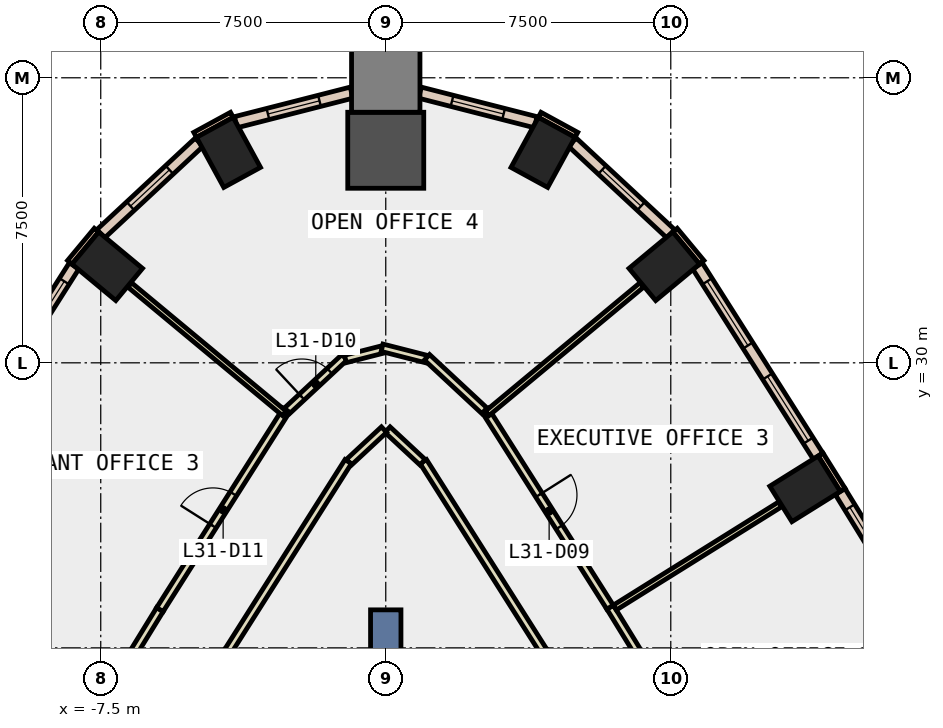
"""IFC4 building model, lengths in metres.
Left out: names, types, materials, properties, quantities, classifications, styles, units other than length and angle.
Written with IfcOpenShell. Run it as: python <this file> out.ifc"""

import sys

from ifc_helpers import new_model, si_unit, direction, frame, frame_2d, origin, origin_2d, place, context, subcontext, project, spatial, rectangle, extrude, element, fill, save


model = new_model("IFC4")
c1 = context("Model", 3, precision=1e-05, world=origin(), true_north=direction((0.0, 1.0)))
c2 = subcontext(c1, "Body", "Model", "MODEL_VIEW")
j1 = project(units=[si_unit("LENGTHUNIT", "METRE"), si_unit("PLANEANGLEUNIT", "RADIAN")], contexts=[c1])
p1 = place(None, origin())
s1 = spatial("IfcSite", under=j1, at=p1, CompositionType="ELEMENT")
p2 = place(p1, origin())
s2 = spatial("IfcBuilding", under=s1, at=p2, CompositionType="ELEMENT")
p3 = place(p2, frame((0.0, 0.0, 142.4)))
s3 = spatial("IfcBuildingStorey", under=s2, at=p3, CompositionType="ELEMENT", Elevation=142.4)
for number, where, z_axis, x_axis in (
    (1, (11.033, 26.684, -0.4), (0.0, 0.0, 1.0), (-0.53, 0.848, 0.0)),
    (2, (7.329, 32.541, -0.4), (0.0, 0.0, 1.0), (-0.639, 0.769, 0.0)),
    (3, (4.138, 35.537, -0.4), (0.0, 0.0, 1.0), (-0.878, 0.479, 0.0)),
):
    element("IfcColumn", number, at=place(p3, frame(where, z_axis=z_axis, x_axis=x_axis)), inside=s3, PredefinedType="COLUMN", context=c2, shape_type="SweptSolid", body=[
        extrude(rectangle(XDim=1.1, YDim=1.5, at=origin_2d()), origin(), (0.0, 0.0, 1.0), 4.2),
    ])
p4 = place(p3, frame((0.0, 35.593, -0.4), z_axis=(0.0, 0.0, 1.0), x_axis=(0.0, 1.0, 0.0)))
e4 = element("IfcColumn", 4, at=p4, inside=s3, PredefinedType="COLUMN", context=c2, shape_type="SweptSolid", body=[
    extrude(rectangle(XDim=2.0, YDim=2.0, at=origin_2d()), origin(), (0.0, 0.0, 1.0), 4.2),
])
for number, where, z_axis, x_axis in (
    (5, (-4.138, 35.537, -0.4), (0.0, 0.0, 1.0), (0.878, 0.479, 0.0)),
    (6, (-7.329, 32.541, -0.4), (0.0, 0.0, 1.0), (0.639, 0.769, 0.0)),
):
    element("IfcColumn", number, at=place(p3, frame(where, z_axis=z_axis, x_axis=x_axis)), inside=s3, PredefinedType="COLUMN", context=c2, shape_type="SweptSolid", body=[
        extrude(rectangle(XDim=1.1, YDim=1.5, at=origin_2d()), origin(), (0.0, 0.0, 1.0), 4.2),
    ])
p5 = place(p3, frame((0.0, 37.493, -0.4), z_axis=(0.0, 0.0, 1.0), x_axis=(0.0, 1.0, 0.0)))
e7 = element("IfcColumn", 7, at=p5, inside=s3, PredefinedType="COLUMN", context=c2, shape_type="SweptSolid", body=[
    extrude(rectangle(XDim=1.8, YDim=1.8, at=origin_2d()), origin(), (0.0, 0.0, 1.0), 4.2),
])
p6 = place(p3, frame((0.0, 14.5, -0.4), z_axis=(0.0, 0.0, 1.0), x_axis=(0.0, 1.0, 0.0)))
e8 = element("IfcWall", 8, at=p6, inside=s3, PredefinedType="SHEAR", context=c2, shape_type="SweptSolid", body=[
    extrude(rectangle(XDim=9.0, YDim=0.8, at=frame_2d((4.5, 0.0))), origin(), (0.0, 0.0, 1.0), 4.2),
])
for number, where, z_axis, x_axis in (
    (9, (5.016, 35.998, 0.0), (0.0, 0.0, 1.0), (-0.878, 0.479, 0.0)),
    (10, (-4.05, 36.525, 0.0), (0.0, 0.0, 1.0), (-0.878, -0.479, 0.0)),
):
    element("IfcWall", number, at=place(p3, frame(where, z_axis=z_axis, x_axis=x_axis)), inside=s3, PredefinedType="STANDARD", context=c2, shape_type="SweptSolid", body=[
        extrude(rectangle(XDim=1.1, YDim=0.15, at=frame_2d((0.55, 0.0))), origin(), (0.0, 0.0, 1.0), 3.8),
    ])
p7 = place(p3, frame((12.024, 26.655, 0.0), z_axis=(0.0, 0.0, 1.0), x_axis=(-0.52997899071, 0.848010771987, 0.0)))
e11 = element("IfcWall", 11, at=p7, inside=s3, PredefinedType="STANDARD", context=c2, shape_type="SweptSolid", body=[
    extrude(rectangle(XDim=1.1, YDim=0.15, at=frame_2d((0.55, 0.0))), origin(), (0.0, 0.0, 1.0), 3.8),
])
for number, where, z_axis, x_axis in (
    (12, (8.315, 32.645, 0.0), (0.0, 0.0, 1.0), (-0.639, 0.769, 0.0)),
    (13, (-7.612, 33.491, 0.0), (0.0, 0.0, 1.0), (-0.639, -0.769, 0.0)),
):
    element("IfcWall", number, at=place(p3, frame(where, z_axis=z_axis, x_axis=x_axis)), inside=s3, PredefinedType="STANDARD", context=c2, shape_type="SweptSolid", body=[
        extrude(rectangle(XDim=1.1, YDim=0.15, at=frame_2d((0.55, 0.0))), origin(), (0.0, 0.0, 1.0), 3.8),
    ])
p8 = place(p3, frame((15.073, 21.544, 0.0), z_axis=(0.0, 0.0, 1.0), x_axis=(-0.523719731127, 0.851890628677, 0.0)))
e14 = element("IfcWall", 14, at=p8, inside=s3, PredefinedType="STANDARD", context=c2, shape_type="SweptSolid", body=[
    extrude(rectangle(XDim=5.952, YDim=0.3, at=frame_2d((2.976, 0.0))), origin(), (0.0, 0.0, 1.0), 3.8),
])
p9 = place(p8, frame((0.488, 0.0, 0.9)))
e15 = element("IfcOpeningElement", 15, at=p9, cuts=e14, PredefinedType="OPENING", context=c2, shape_type="SweptSolid", body=[
    extrude(rectangle(XDim=2.0, YDim=2.6, at=frame_2d((1.0, 1.3))), frame((0.0, 0.16, 0.0), z_axis=(0.0, -1.0, 0.0), x_axis=(1.0, 0.0, 0.0)), (0.0, 0.0, 1.0), 0.32),
])
p10 = place(p8, frame((3.464, 0.0, 0.9)))
e16 = element("IfcOpeningElement", 16, at=p10, cuts=e14, PredefinedType="OPENING", context=c2, shape_type="SweptSolid", body=[
    extrude(rectangle(XDim=2.0, YDim=2.6, at=frame_2d((1.0, 1.3))), frame((0.0, 0.16, 0.0), z_axis=(0.0, -1.0, 0.0), x_axis=(1.0, 0.0, 0.0)), (0.0, 0.0, 1.0), 0.32),
])
p11 = place(p3, frame((11.375, 27.545, 0.0), z_axis=(0.0, 0.0, 1.0), x_axis=(-0.535403761464, 0.844596242124, 0.0)))
e17 = element("IfcWall", 17, at=p11, inside=s3, PredefinedType="STANDARD", context=c2, shape_type="SweptSolid", body=[
    extrude(rectangle(XDim=5.928, YDim=0.3, at=frame_2d((2.964, 0.0))), origin(), (0.0, 0.0, 1.0), 3.8),
])
p12 = place(p11, frame((0.482, 0.0, 0.9)))
e18 = element("IfcOpeningElement", 18, at=p12, cuts=e17, PredefinedType="OPENING", context=c2, shape_type="SweptSolid", body=[
    extrude(rectangle(XDim=2.0, YDim=2.6, at=frame_2d((1.0, 1.3))), frame((0.0, 0.16, 0.0), z_axis=(0.0, -1.0, 0.0), x_axis=(1.0, 0.0, 0.0)), (0.0, 0.0, 1.0), 0.32),
])
p13 = place(p11, frame((3.446, 0.0, 0.9)))
e19 = element("IfcOpeningElement", 19, at=p13, cuts=e17, PredefinedType="OPENING", context=c2, shape_type="SweptSolid", body=[
    extrude(rectangle(XDim=2.0, YDim=2.6, at=frame_2d((1.0, 1.3))), frame((0.0, 0.16, 0.0), z_axis=(0.0, -1.0, 0.0), x_axis=(1.0, 0.0, 0.0)), (0.0, 0.0, 1.0), 0.32),
])
p14 = place(p3, frame((7.499, 33.396, 0.0), z_axis=(0.0, 0.0, 1.0), x_axis=(-0.732121882671, 0.681173655475, 0.0)))
e20 = element("IfcWall", 20, at=p14, inside=s3, PredefinedType="STANDARD", context=c2, shape_type="SweptSolid", body=[
    extrude(rectangle(XDim=3.536, YDim=0.3, at=frame_2d((1.768, 0.0))), origin(), (0.0, 0.0, 1.0), 3.8),
])
p15 = place(p14, frame((1.068, 0.0, 0.9)))
e21 = element("IfcOpeningElement", 21, at=p15, cuts=e20, PredefinedType="OPENING", context=c2, shape_type="SweptSolid", body=[
    extrude(rectangle(XDim=1.4, YDim=2.6, at=frame_2d((0.7, 1.3))), frame((0.0, 0.16, 0.0), z_axis=(0.0, -1.0, 0.0), x_axis=(1.0, 0.0, 0.0)), (0.0, 0.0, 1.0), 0.32),
])
p16 = place(p3, frame((3.946, 36.331, 0.0), z_axis=(0.0, 0.0, 1.0), x_axis=(-0.968929586963, 0.247336724947, 0.0)))
e22 = element("IfcWall", 22, at=p16, inside=s3, PredefinedType="STANDARD", context=c2, shape_type="SweptSolid", body=[
    extrude(rectangle(XDim=3.145, YDim=0.3, at=frame_2d((1.572, 0.0))), origin(), (0.0, 0.0, 1.0), 3.8),
])
p17 = place(p16, frame((0.872, 0.0, 0.9)))
e23 = element("IfcOpeningElement", 23, at=p17, cuts=e22, PredefinedType="OPENING", context=c2, shape_type="SweptSolid", body=[
    extrude(rectangle(XDim=1.4, YDim=2.6, at=frame_2d((0.7, 1.3))), frame((0.0, 0.16, 0.0), z_axis=(0.0, -1.0, 0.0), x_axis=(1.0, 0.0, 0.0)), (0.0, 0.0, 1.0), 0.32),
])
p18 = place(p3, frame((-0.899, 37.109, 0.0), z_axis=(0.0, 0.0, 1.0), x_axis=(-0.968929586963, -0.247336724947, 0.0)))
e24 = element("IfcWall", 24, at=p18, inside=s3, PredefinedType="STANDARD", context=c2, shape_type="SweptSolid", body=[
    extrude(rectangle(XDim=3.145, YDim=0.3, at=frame_2d((1.572, 0.0))), origin(), (0.0, 0.0, 1.0), 3.8),
])
p19 = place(p18, frame((0.872, 0.0, 0.9)))
e25 = element("IfcOpeningElement", 25, at=p19, cuts=e24, PredefinedType="OPENING", context=c2, shape_type="SweptSolid", body=[
    extrude(rectangle(XDim=1.4, YDim=2.6, at=frame_2d((0.7, 1.3))), frame((0.0, 0.16, 0.0), z_axis=(0.0, -1.0, 0.0), x_axis=(1.0, 0.0, 0.0)), (0.0, 0.0, 1.0), 0.32),
])
p20 = place(p3, frame((-4.91, 35.805, 0.0), z_axis=(0.0, 0.0, 1.0), x_axis=(-0.732121882671, -0.681173655475, 0.0)))
e26 = element("IfcWall", 26, at=p20, inside=s3, PredefinedType="STANDARD", context=c2, shape_type="SweptSolid", body=[
    extrude(rectangle(XDim=3.536, YDim=0.3, at=frame_2d((1.768, 0.0))), origin(), (0.0, 0.0, 1.0), 3.8),
])
p21 = place(p20, frame((1.068, 0.0, 0.9)))
e27 = element("IfcOpeningElement", 27, at=p21, cuts=e26, PredefinedType="OPENING", context=c2, shape_type="SweptSolid", body=[
    extrude(rectangle(XDim=1.4, YDim=2.6, at=frame_2d((0.7, 1.3))), frame((0.0, 0.16, 0.0), z_axis=(0.0, -1.0, 0.0), x_axis=(1.0, 0.0, 0.0)), (0.0, 0.0, 1.0), 0.32),
])
p22 = place(p3, frame((-8.201, 32.552, 0.0), z_axis=(0.0, 0.0, 1.0), x_axis=(-0.535403761464, -0.844596242124, 0.0)))
e28 = element("IfcWall", 28, at=p22, inside=s3, PredefinedType="STANDARD", context=c2, shape_type="SweptSolid", body=[
    extrude(rectangle(XDim=5.928, YDim=0.3, at=frame_2d((2.964, 0.0))), origin(), (0.0, 0.0, 1.0), 3.8),
])
p23 = place(p22, frame((0.482, 0.0, 0.9)))
e29 = element("IfcOpeningElement", 29, at=p23, cuts=e28, PredefinedType="OPENING", context=c2, shape_type="SweptSolid", body=[
    extrude(rectangle(XDim=2.0, YDim=2.6, at=frame_2d((1.0, 1.3))), frame((0.0, 0.16, 0.0), z_axis=(0.0, -1.0, 0.0), x_axis=(1.0, 0.0, 0.0)), (0.0, 0.0, 1.0), 0.32),
])
p24 = place(p22, frame((3.446, 0.0, 0.9)))
e30 = element("IfcOpeningElement", 30, at=p24, cuts=e28, PredefinedType="OPENING", context=c2, shape_type="SweptSolid", body=[
    extrude(rectangle(XDim=2.0, YDim=2.6, at=frame_2d((1.0, 1.3))), frame((0.0, 0.16, 0.0), z_axis=(0.0, -1.0, 0.0), x_axis=(1.0, 0.0, 0.0)), (0.0, 0.0, 1.0), 0.32),
])
p25 = place(p3, frame((4.162, 22.395, 0.0), z_axis=(0.0, 0.0, 1.0), x_axis=(-0.535496886312, 0.844537201519, 0.0)))
e31 = element("IfcWall", 31, at=p25, inside=s3, PredefinedType="PARTITIONING", context=c2, shape_type="SweptSolid", body=[
    extrude(rectangle(XDim=5.927, YDim=0.2, at=frame_2d((2.964, 0.0))), origin(), (0.0, 0.0, 1.0), 3.8),
])
for number, where, z_axis, x_axis in (
    (32, (0.968, 27.385, 0.0), (0.0, 0.0, 1.0), (-0.733, 0.681, 0.0)),
    (33, (-0.046, 28.242, 0.0), (0.0, 0.0, 1.0), (-0.733, -0.681, 0.0)),
):
    element("IfcWall", number, at=place(p3, frame(where, z_axis=z_axis, x_axis=x_axis)), inside=s3, PredefinedType="PARTITIONING", context=c2, shape_type="SweptSolid", body=[
        extrude(rectangle(XDim=1.259, YDim=0.2, at=frame_2d((0.629, 0.0))), origin(), (0.0, 0.0, 1.0), 3.8),
    ])
p26 = place(p3, frame((-0.988, 27.401, 0.0), z_axis=(0.0, 0.0, 1.0), x_axis=(-0.535496886312, -0.844537201519, 0.0)))
e34 = element("IfcWall", 34, at=p26, inside=s3, PredefinedType="PARTITIONING", context=c2, shape_type="SweptSolid", body=[
    extrude(rectangle(XDim=5.927, YDim=0.2, at=frame_2d((2.964, 0.0))), origin(), (0.0, 0.0, 1.0), 3.8),
])
p27 = place(p3, frame((5.904, 23.571, 0.0), z_axis=(0.0, 0.0, 1.0), x_axis=(0.523647026552, -0.851935321244, 0.0)))
e35 = element("IfcWall", 35, at=p27, inside=s3, PredefinedType="PARTITIONING", context=c2, shape_type="SweptSolid", body=[
    extrude(rectangle(XDim=6.957, YDim=0.2, at=frame_2d((3.479, 0.0))), origin(), (0.0, 0.0, 1.0), 3.8),
])
p28 = place(p27, frame((3.053, 0.0, 0.0)))
e36 = element("IfcOpeningElement", 36, at=p28, cuts=e35, PredefinedType="OPENING", context=c2, shape_type="SweptSolid", body=[
    extrude(rectangle(XDim=1.0, YDim=2.1, at=frame_2d((0.5, 1.05))), frame((0.0, 0.11, 0.0), z_axis=(0.0, -1.0, 0.0), x_axis=(1.0, 0.0, 0.0)), (0.0, 0.0, 1.0), 0.22),
])
p29 = place(p3, frame((2.616, 28.754, 0.0), z_axis=(0.0, 0.0, 1.0), x_axis=(0.535405016332, -0.844595446641, 0.0)))
e37 = element("IfcWall", 37, at=p29, inside=s3, PredefinedType="PARTITIONING", context=c2, shape_type="SweptSolid", body=[
    extrude(rectangle(XDim=6.138, YDim=0.2, at=frame_2d((3.069, 0.0))), origin(), (0.0, 0.0, 1.0), 3.8),
])
p30 = place(p29, frame((2.644, 0.0, 0.0)))
e38 = element("IfcOpeningElement", 38, at=p30, cuts=e37, PredefinedType="OPENING", context=c2, shape_type="SweptSolid", body=[
    extrude(rectangle(XDim=1.0, YDim=2.1, at=frame_2d((0.5, 1.05))), frame((0.0, 0.11, 0.0), z_axis=(0.0, -1.0, 0.0), x_axis=(1.0, 0.0, 0.0)), (0.0, 0.0, 1.0), 0.22),
])
p31 = place(p3, frame((-2.597, 28.738, 0.0), z_axis=(0.0, 0.0, 1.0), x_axis=(0.73206471367, 0.681235095249, 0.0)))
e39 = element("IfcWall", 39, at=p31, inside=s3, PredefinedType="PARTITIONING", context=c2, shape_type="SweptSolid", body=[
    extrude(rectangle(XDim=2.065, YDim=0.2, at=frame_2d((1.033, 0.0))), origin(), (0.0, 0.0, 1.0), 3.8),
])
p32 = place(p31, frame((0.532, 0.0, 0.0)))
e40 = element("IfcOpeningElement", 40, at=p32, cuts=e39, PredefinedType="OPENING", context=c2, shape_type="SweptSolid", body=[
    extrude(rectangle(XDim=1.0, YDim=2.1, at=frame_2d((0.5, 1.05))), frame((0.0, 0.11, 0.0), z_axis=(0.0, -1.0, 0.0), x_axis=(1.0, 0.0, 0.0)), (0.0, 0.0, 1.0), 0.22),
])
p33 = place(p3, frame((-1.061, 30.101, 0.0), z_axis=(0.0, 0.0, 1.0), x_axis=(0.968991499392, 0.247094059227, 0.0)))
e41 = element("IfcWall", 41, at=p33, inside=s3, PredefinedType="PARTITIONING", context=c2, shape_type="SweptSolid", body=[
    extrude(rectangle(XDim=0.995, YDim=0.2, at=frame_2d((0.498, 0.0))), origin(), (0.0, 0.0, 1.0), 3.8),
])
p34 = place(p3, frame((-0.097, 30.397, 0.0), z_axis=(0.0, 0.0, 1.0), x_axis=(0.968867686006, -0.247579092439, 0.0)))
e42 = element("IfcWall", 42, at=p34, inside=s3, PredefinedType="PARTITIONING", context=c2, shape_type="SweptSolid", body=[
    extrude(rectangle(XDim=1.195, YDim=0.2, at=frame_2d((0.598, 0.0))), origin(), (0.0, 0.0, 1.0), 3.8),
])
p35 = place(p3, frame((1.085, 30.145, 0.0), z_axis=(0.0, 0.0, 1.0), x_axis=(0.73206471367, -0.681235095249, 0.0)))
e43 = element("IfcWall", 43, at=p35, inside=s3, PredefinedType="PARTITIONING", context=c2, shape_type="SweptSolid", body=[
    extrude(rectangle(XDim=2.065, YDim=0.2, at=frame_2d((1.033, 0.0))), origin(), (0.0, 0.0, 1.0), 3.8),
])
p36 = place(p3, frame((-7.725, 20.608, 0.0), z_axis=(0.0, 0.0, 1.0), x_axis=(0.523645038298, 0.851936543333, 0.0)))
e44 = element("IfcWall", 44, at=p36, inside=s3, PredefinedType="PARTITIONING", context=c2, shape_type="SweptSolid", body=[
    extrude(rectangle(XDim=3.403, YDim=0.2, at=frame_2d((1.702, 0.0))), origin(), (0.0, 0.0, 1.0), 3.8),
])
p37 = place(p3, frame((-5.943, 23.507, 0.0), z_axis=(0.0, 0.0, 1.0), x_axis=(0.535529721247, 0.844516380931, 0.0)))
e45 = element("IfcWall", 45, at=p37, inside=s3, PredefinedType="PARTITIONING", context=c2, shape_type="SweptSolid", body=[
    extrude(rectangle(XDim=6.213, YDim=0.2, at=frame_2d((3.106, 0.0))), origin(), (0.0, 0.0, 1.0), 3.8),
])
p38 = place(p37, frame((2.607, 0.0, 0.0)))
e46 = element("IfcOpeningElement", 46, at=p38, cuts=e45, PredefinedType="OPENING", context=c2, shape_type="SweptSolid", body=[
    extrude(rectangle(XDim=1.0, YDim=2.1, at=frame_2d((0.5, 1.05))), frame((0.0, 0.11, 0.0), z_axis=(0.0, -1.0, 0.0), x_axis=(1.0, 0.0, 0.0)), (0.0, 0.0, 1.0), 0.22),
])
p39 = place(p3, frame((6.028, 23.56, 0.0), z_axis=(0.0, 0.0, 1.0), x_axis=(0.848246841914, 0.529601071734, 0.0)))
e47 = element("IfcWall", 47, at=p39, inside=s3, PredefinedType="PARTITIONING", context=c2, shape_type="SweptSolid", body=[
    extrude(rectangle(XDim=5.13, YDim=0.15, at=frame_2d((2.565, 0.0))), origin(), (0.0, 0.0, 1.0), 3.8),
])
for number, where, z_axis, x_axis in (
    (48, (2.67, 28.67, 0.0), (0.0, 0.0, 1.0), (0.769, 0.639, 0.0)),
    (49, (-2.67, 28.67, 0.0), (0.0, 0.0, 1.0), (-0.769, 0.639, 0.0)),
):
    element("IfcWall", number, at=place(p3, frame(where, z_axis=z_axis, x_axis=x_axis)), inside=s3, PredefinedType="PARTITIONING", context=c2, shape_type="SweptSolid", body=[
        extrude(rectangle(XDim=5.288, YDim=0.15, at=frame_2d((2.644, 0.0))), origin(), (0.0, 0.0, 1.0), 3.8),
    ])
p40 = place(p3, frame((-7.679, 20.492, 0.0), z_axis=(0.0, 0.0, 1.0), x_axis=(-0.851897179877, 0.523709074695, 0.0)))
e50 = element("IfcWall", 50, at=p40, inside=s3, PredefinedType="PARTITIONING", context=c2, shape_type="SweptSolid", body=[
    extrude(rectangle(XDim=6.7, YDim=0.15, at=frame_2d((3.35, 0.0))), origin(), (0.0, 0.0, 1.0), 3.8),
])
p41 = place(p10, origin())
e51 = element("IfcWindow", 51, at=p41, inside=s3, PartitioningType="SINGLE_PANEL", PredefinedType="WINDOW", context=c2, shape_type="SweptSolid", body=[
    extrude(rectangle(XDim=2.0, YDim=2.6, at=frame_2d((1.0, 1.3))), frame((0.0, 0.03, 0.0), z_axis=(0.0, -1.0, 0.0), x_axis=(1.0, 0.0, 0.0)), (0.0, 0.0, 1.0), 0.06),
])
fill(e16, e51)
p42 = place(p12, origin())
e52 = element("IfcWindow", 52, at=p42, inside=s3, PartitioningType="SINGLE_PANEL", PredefinedType="WINDOW", context=c2, shape_type="SweptSolid", body=[
    extrude(rectangle(XDim=2.0, YDim=2.6, at=frame_2d((1.0, 1.3))), frame((0.0, 0.03, 0.0), z_axis=(0.0, -1.0, 0.0), x_axis=(1.0, 0.0, 0.0)), (0.0, 0.0, 1.0), 0.06),
])
fill(e18, e52)
p43 = place(p13, origin())
e53 = element("IfcWindow", 53, at=p43, inside=s3, PartitioningType="SINGLE_PANEL", PredefinedType="WINDOW", context=c2, shape_type="SweptSolid", body=[
    extrude(rectangle(XDim=2.0, YDim=2.6, at=frame_2d((1.0, 1.3))), frame((0.0, 0.03, 0.0), z_axis=(0.0, -1.0, 0.0), x_axis=(1.0, 0.0, 0.0)), (0.0, 0.0, 1.0), 0.06),
])
fill(e19, e53)
p44 = place(p15, origin())
e54 = element("IfcWindow", 54, at=p44, inside=s3, PartitioningType="SINGLE_PANEL", PredefinedType="WINDOW", context=c2, shape_type="SweptSolid", body=[
    extrude(rectangle(XDim=1.4, YDim=2.6, at=frame_2d((0.7, 1.3))), frame((0.0, 0.03, 0.0), z_axis=(0.0, -1.0, 0.0), x_axis=(1.0, 0.0, 0.0)), (0.0, 0.0, 1.0), 0.06),
])
fill(e21, e54)
p45 = place(p17, origin())
e55 = element("IfcWindow", 55, at=p45, inside=s3, PartitioningType="SINGLE_PANEL", PredefinedType="WINDOW", context=c2, shape_type="SweptSolid", body=[
    extrude(rectangle(XDim=1.4, YDim=2.6, at=frame_2d((0.7, 1.3))), frame((0.0, 0.03, 0.0), z_axis=(0.0, -1.0, 0.0), x_axis=(1.0, 0.0, 0.0)), (0.0, 0.0, 1.0), 0.06),
])
fill(e23, e55)
p46 = place(p19, origin())
e56 = element("IfcWindow", 56, at=p46, inside=s3, PartitioningType="SINGLE_PANEL", PredefinedType="WINDOW", context=c2, shape_type="SweptSolid", body=[
    extrude(rectangle(XDim=1.4, YDim=2.6, at=frame_2d((0.7, 1.3))), frame((0.0, 0.03, 0.0), z_axis=(0.0, -1.0, 0.0), x_axis=(1.0, 0.0, 0.0)), (0.0, 0.0, 1.0), 0.06),
])
fill(e25, e56)
p47 = place(p21, origin())
e57 = element("IfcWindow", 57, at=p47, inside=s3, PartitioningType="SINGLE_PANEL", PredefinedType="WINDOW", context=c2, shape_type="SweptSolid", body=[
    extrude(rectangle(XDim=1.4, YDim=2.6, at=frame_2d((0.7, 1.3))), frame((0.0, 0.03, 0.0), z_axis=(0.0, -1.0, 0.0), x_axis=(1.0, 0.0, 0.0)), (0.0, 0.0, 1.0), 0.06),
])
fill(e27, e57)
p48 = place(p23, origin())
e58 = element("IfcWindow", 58, at=p48, inside=s3, PartitioningType="SINGLE_PANEL", PredefinedType="WINDOW", context=c2, shape_type="SweptSolid", body=[
    extrude(rectangle(XDim=2.0, YDim=2.6, at=frame_2d((1.0, 1.3))), frame((0.0, 0.03, 0.0), z_axis=(0.0, -1.0, 0.0), x_axis=(1.0, 0.0, 0.0)), (0.0, 0.0, 1.0), 0.06),
])
fill(e29, e58)
p49 = place(p30, origin())
e59 = element("IfcDoor", 59, at=p49, inside=s3, OperationType="SINGLE_SWING_LEFT", PredefinedType="DOOR", context=c2, shape_type="SweptSolid", body=[
    extrude(rectangle(XDim=1.0, YDim=2.1, at=frame_2d((0.5, 1.05))), frame((0.0, 0.025, 0.0), z_axis=(0.0, -1.0, 0.0), x_axis=(1.0, 0.0, 0.0)), (0.0, 0.0, 1.0), 0.05),
])
fill(e38, e59)
p50 = place(p32, origin())
e60 = element("IfcDoor", 60, at=p50, inside=s3, OperationType="SINGLE_SWING_LEFT", PredefinedType="DOOR", context=c2, shape_type="SweptSolid", body=[
    extrude(rectangle(XDim=1.0, YDim=2.1, at=frame_2d((0.5, 1.05))), frame((0.0, 0.025, 0.0), z_axis=(0.0, -1.0, 0.0), x_axis=(1.0, 0.0, 0.0)), (0.0, 0.0, 1.0), 0.05),
])
fill(e40, e60)
p51 = place(p38, origin())
e61 = element("IfcDoor", 61, at=p51, inside=s3, OperationType="SINGLE_SWING_LEFT", PredefinedType="DOOR", context=c2, shape_type="SweptSolid", body=[
    extrude(rectangle(XDim=1.0, YDim=2.1, at=frame_2d((0.5, 1.05))), frame((0.0, 0.025, 0.0), z_axis=(0.0, -1.0, 0.0), x_axis=(1.0, 0.0, 0.0)), (0.0, 0.0, 1.0), 0.05),
])
fill(e46, e61)
save(model, sys.argv[1])
